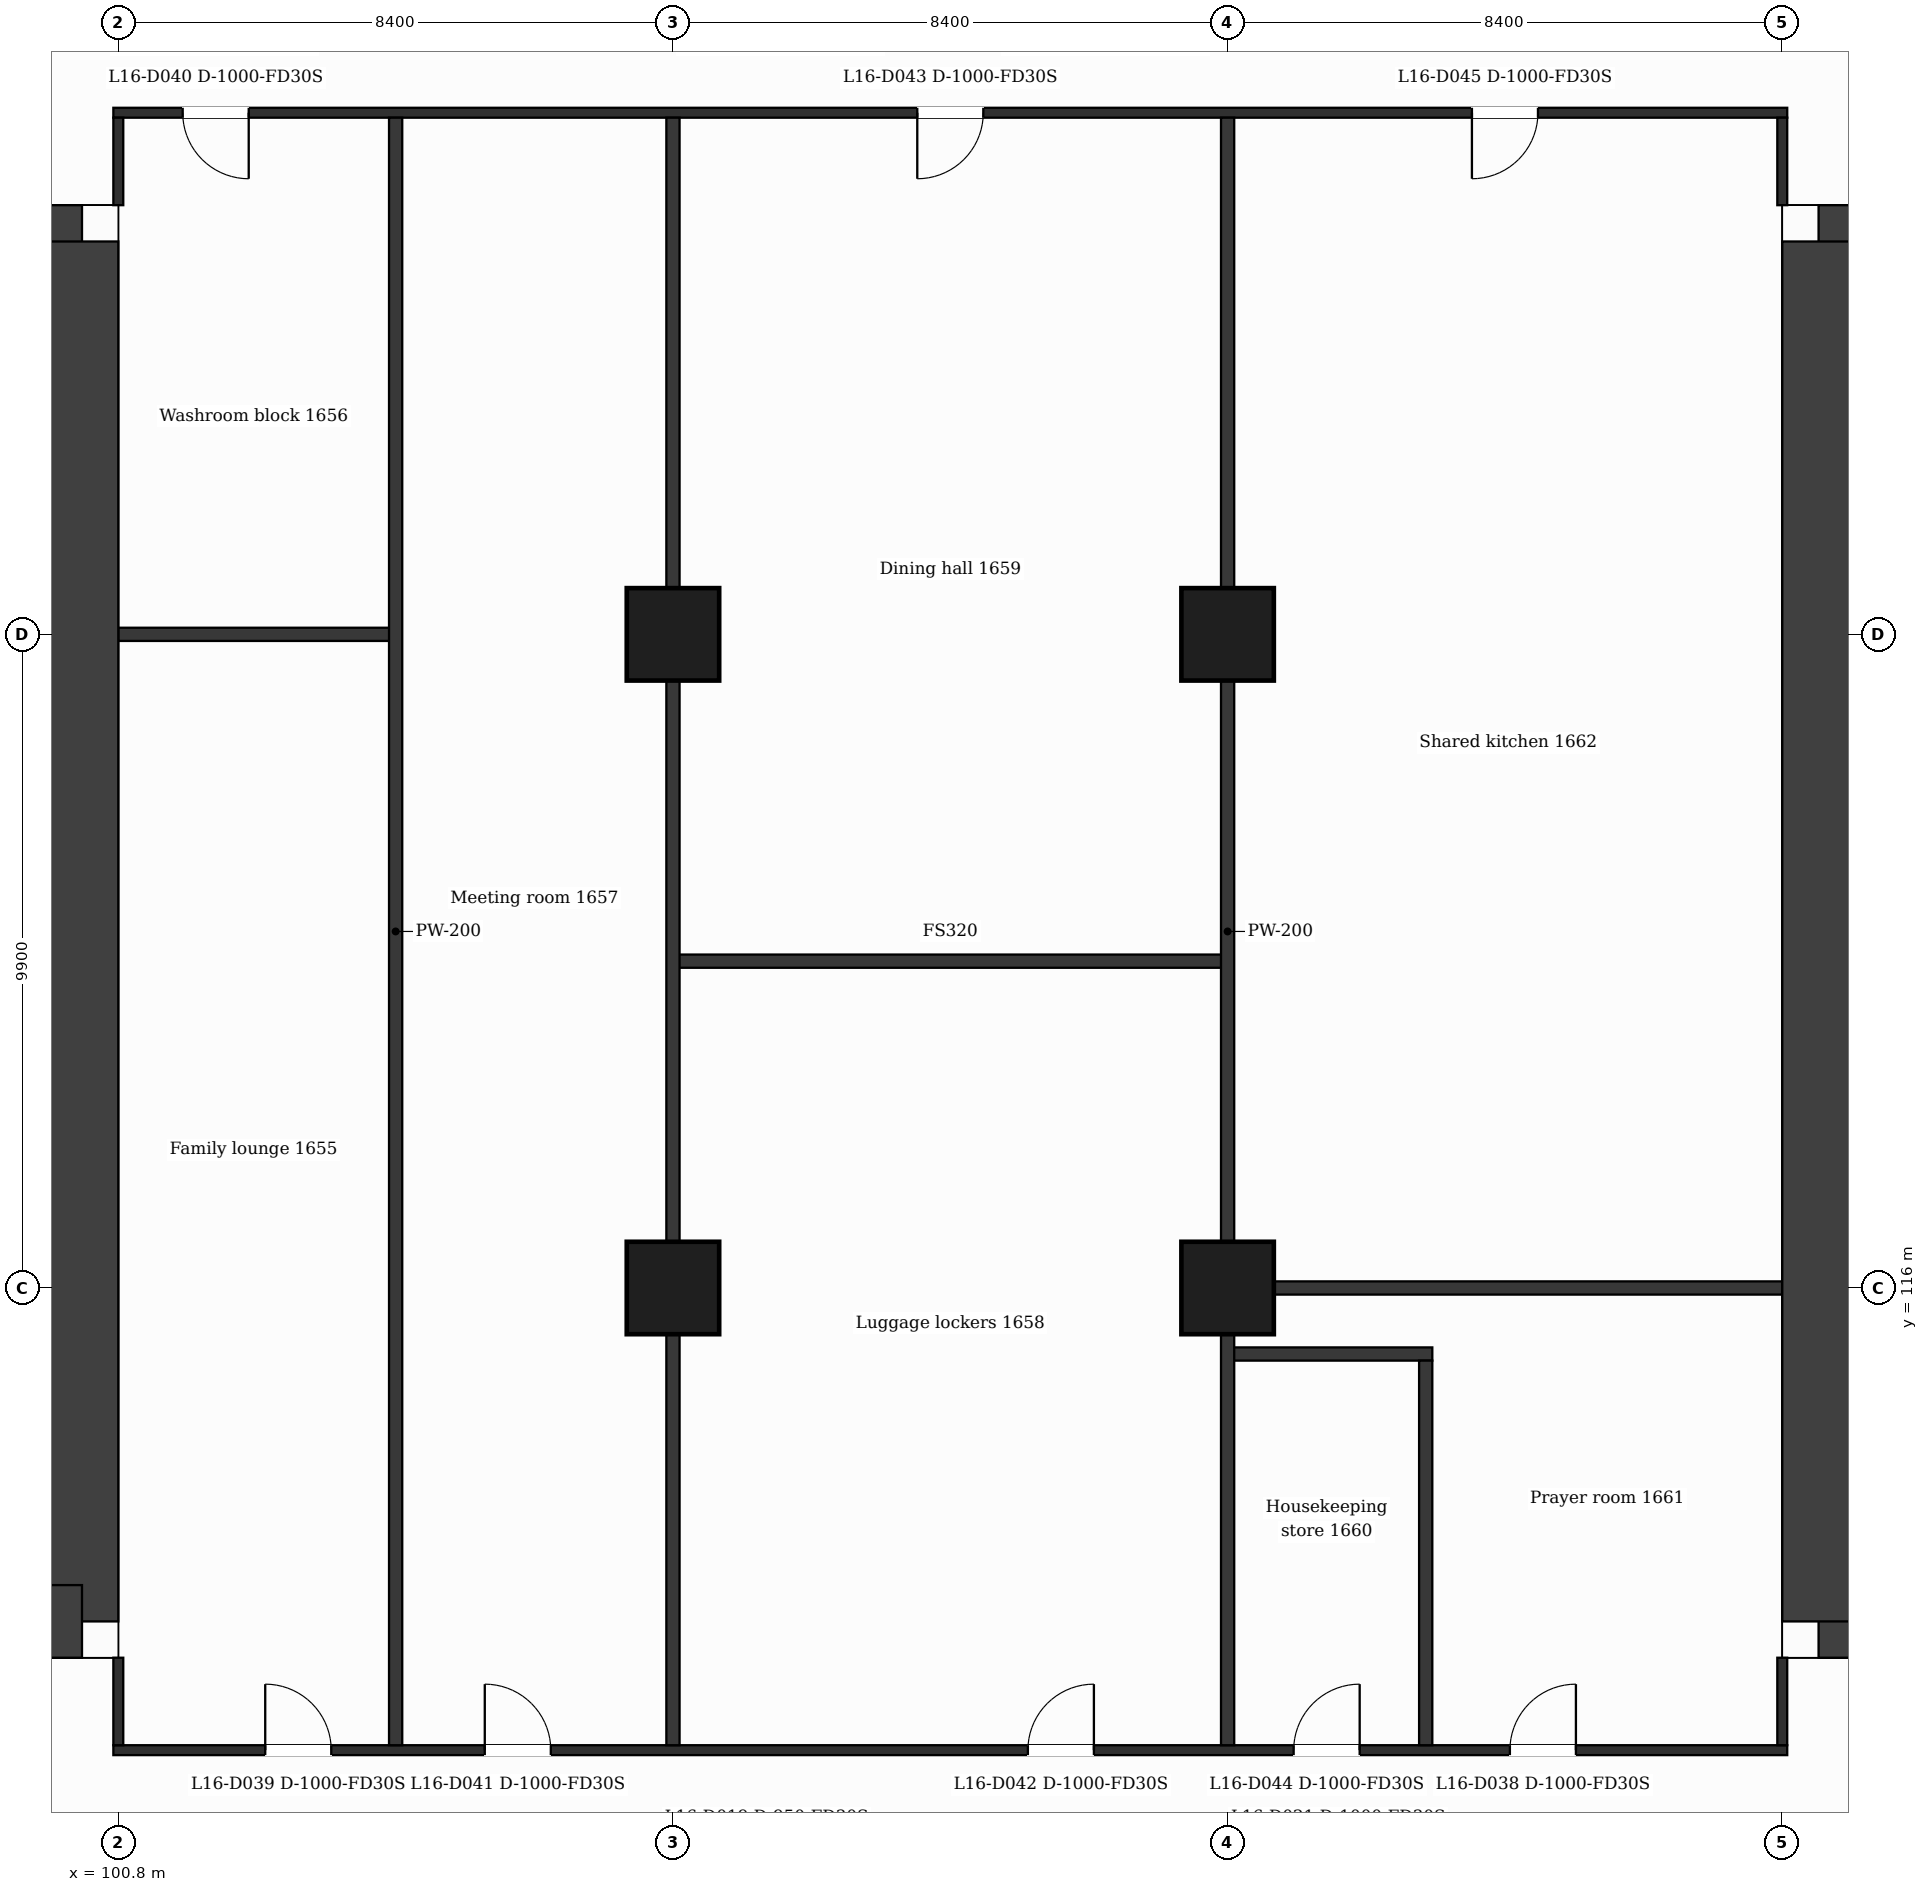
"""IFC4 building model, lengths in metres.
Left out: names, types, materials, properties, quantities, classifications, styles, units other than length and angle.
Written with IfcOpenShell. Run it as: python <this file> out.ifc"""

import sys

from ifc_helpers import new_model, si_unit, direction, frame, frame_2d, origin, origin_2d, place, context, subcontext, project, spatial, rectangle, extrude, element, fill, save


model = new_model("IFC4")
c1 = context("Model", 3, precision=1e-05, world=origin(), true_north=direction((0.0, 1.0)))
c2 = subcontext(c1, "Body", "Model", "MODEL_VIEW")
j1 = project(units=[si_unit("LENGTHUNIT", "METRE"), si_unit("PLANEANGLEUNIT", "RADIAN")], contexts=[c1])
p1 = place(None, origin())
s1 = spatial("IfcSite", under=j1, at=p1, CompositionType="ELEMENT")
p2 = place(p1, origin())
s2 = spatial("IfcBuilding", under=s1, at=p2, CompositionType="ELEMENT")
p3 = place(p2, frame((0.0, 0.0, 74.0)))
s3 = spatial("IfcBuildingStorey", under=s2, at=p3, CompositionType="ELEMENT", Elevation=74.0)
p4 = place(p3, frame((89.112, 131.85, 0.0), z_axis=(0.0, 0.0, 1.0), x_axis=(1.0, 0.0, 0.0)))
e1 = element("IfcWall", 1, at=p4, inside=s3, PredefinedType="SHEAR", context=c2, shape_type="SweptSolid", body=[
    extrude(rectangle(XDim=11.138, YDim=1.1, at=frame_2d((5.569, 0.0))), origin(), (0.0, 0.0, 1.0), 3.5),
])
p5 = place(p4, frame((6.552, 0.0, 0.0)))
e2 = element("IfcOpeningElement", 2, at=p5, cuts=e1, PredefinedType="OPENING", context=c2, shape_type="SweptSolid", body=[
    extrude(rectangle(XDim=1.2, YDim=2.1, at=frame_2d((0.6, 1.05))), frame((0.0, 0.56, 0.0), z_axis=(0.0, -1.0, 0.0), x_axis=(1.0, 0.0, 0.0)), (0.0, 0.0, 1.0), 1.12),
])
p6 = place(p3, frame((100.25, 131.85, 0.0), z_axis=(0.0, 0.0, 1.0), x_axis=(0.0, -1.0, 0.0)))
e3 = element("IfcWall", 3, at=p6, inside=s3, PredefinedType="SHEAR", context=c2, shape_type="SweptSolid", body=[
    extrude(rectangle(XDim=20.9, YDim=1.1, at=frame_2d((10.45, 0.0))), origin(), (0.0, 0.0, 1.0), 3.5),
])
p7 = place(p3, frame((100.25, 110.95, 0.0), z_axis=(0.0, 0.0, 1.0), x_axis=(-1.0, 0.0, 0.0)))
e4 = element("IfcWall", 4, at=p7, inside=s3, PredefinedType="SHEAR", context=c2, shape_type="SweptSolid", body=[
    extrude(rectangle(XDim=13.952, YDim=1.1, at=frame_2d((6.976, 0.0))), origin(), (0.0, 0.0, 1.0), 3.5),
])
p8 = place(p7, frame((5.748, 0.0, 0.0)))
e5 = element("IfcOpeningElement", 5, at=p8, cuts=e4, PredefinedType="OPENING", context=c2, shape_type="SweptSolid", body=[
    extrude(rectangle(XDim=1.4, YDim=2.1, at=frame_2d((0.7, 1.05))), frame((0.0, 0.56, 0.0), z_axis=(0.0, -1.0, 0.0), x_axis=(1.0, 0.0, 0.0)), (0.0, 0.0, 1.0), 1.12),
])
p9 = place(p3, frame((126.55, 131.85, 0.0), z_axis=(0.0, 0.0, 1.0), x_axis=(1.0, 0.0, 0.0)))
e6 = element("IfcWall", 6, at=p9, inside=s3, PredefinedType="SHEAR", context=c2, shape_type="SweptSolid", body=[
    extrude(rectangle(XDim=11.138, YDim=1.1, at=frame_2d((5.569, 0.0))), origin(), (0.0, 0.0, 1.0), 3.5),
])
p10 = place(p9, frame((3.386, 0.0, 0.0)))
e7 = element("IfcOpeningElement", 7, at=p10, cuts=e6, PredefinedType="OPENING", context=c2, shape_type="SweptSolid", body=[
    extrude(rectangle(XDim=1.2, YDim=2.1, at=frame_2d((0.6, 1.05))), frame((0.0, 0.56, 0.0), z_axis=(0.0, -1.0, 0.0), x_axis=(1.0, 0.0, 0.0)), (0.0, 0.0, 1.0), 1.12),
])
p11 = place(p3, frame((140.502, 110.95, 0.0), z_axis=(0.0, 0.0, 1.0), x_axis=(-1.0, 0.0, 0.0)))
e8 = element("IfcWall", 8, at=p11, inside=s3, PredefinedType="SHEAR", context=c2, shape_type="SweptSolid", body=[
    extrude(rectangle(XDim=13.952, YDim=1.1, at=frame_2d((6.976, 0.0))), origin(), (0.0, 0.0, 1.0), 3.5),
])
p12 = place(p11, frame((6.804, 0.0, 0.0)))
e9 = element("IfcOpeningElement", 9, at=p12, cuts=e8, PredefinedType="OPENING", context=c2, shape_type="SweptSolid", body=[
    extrude(rectangle(XDim=1.4, YDim=2.1, at=frame_2d((0.7, 1.05))), frame((0.0, 0.56, 0.0), z_axis=(0.0, -1.0, 0.0), x_axis=(1.0, 0.0, 0.0)), (0.0, 0.0, 1.0), 1.12),
])
p13 = place(p3, frame((126.55, 110.95, 0.0), z_axis=(0.0, 0.0, 1.0), x_axis=(0.0, 1.0, 0.0)))
e10 = element("IfcWall", 10, at=p13, inside=s3, PredefinedType="SHEAR", context=c2, shape_type="SweptSolid", body=[
    extrude(rectangle(XDim=20.9, YDim=1.1, at=frame_2d((10.45, 0.0))), origin(), (0.0, 0.0, 1.0), 3.5),
])
for number, where, z_axis, x_axis in (
    (11, (109.2, 116.0, 0.0), (0.0, 0.0, 1.0), (1.0, 0.0, 0.0)),
    (12, (117.6, 116.0, 0.0), (0.0, 0.0, 1.0), (1.0, 0.0, 0.0)),
    (13, (109.2, 125.9, 0.0), (0.0, 0.0, 1.0), (1.0, 0.0, 0.0)),
    (14, (117.6, 125.9, 0.0), (0.0, 0.0, 1.0), (1.0, 0.0, 0.0)),
):
    element("IfcColumn", number, at=place(p3, frame(where, z_axis=z_axis, x_axis=x_axis)), inside=s3, PredefinedType="COLUMN", context=c2, shape_type="SweptSolid", body=[
        extrude(rectangle(XDim=1.4, YDim=1.4, at=origin_2d()), origin(), (0.0, 0.0, 1.0), 3.5),
    ])
p14 = place(p3, frame((100.725, 109.0, 0.0), z_axis=(0.0, 0.0, 1.0), x_axis=(1.0, 0.0, 0.0)))
e15 = element("IfcWall", 15, at=p14, inside=s3, PredefinedType="PARTITIONING", context=c2, shape_type="SweptSolid", body=[
    extrude(rectangle(XDim=25.35, YDim=0.15, at=frame_2d((12.675, 0.0))), origin(), (0.0, 0.0, 1.0), 3.18),
])
p15 = place(p14, frame((21.15, 0.0, 0.0)))
e16 = element("IfcOpeningElement", 16, at=p15, cuts=e15, PredefinedType="OPENING", context=c2, shape_type="SweptSolid", body=[
    extrude(rectangle(XDim=1.0, YDim=2.1, at=frame_2d((0.5, 1.05))), frame((0.0, 0.085, 0.0), z_axis=(0.0, -1.0, 0.0), x_axis=(1.0, 0.0, 0.0)), (0.0, 0.0, 1.0), 0.17),
])
p16 = place(p14, frame((2.3, 0.0, 0.0)))
e17 = element("IfcOpeningElement", 17, at=p16, cuts=e15, PredefinedType="OPENING", context=c2, shape_type="SweptSolid", body=[
    extrude(rectangle(XDim=1.0, YDim=2.1, at=frame_2d((0.5, 1.05))), frame((0.0, 0.085, 0.0), z_axis=(0.0, -1.0, 0.0), x_axis=(1.0, 0.0, 0.0)), (0.0, 0.0, 1.0), 0.17),
])
p17 = place(p14, frame((5.625, 0.0, 0.0)))
e18 = element("IfcOpeningElement", 18, at=p17, cuts=e15, PredefinedType="OPENING", context=c2, shape_type="SweptSolid", body=[
    extrude(rectangle(XDim=1.0, YDim=2.1, at=frame_2d((0.5, 1.05))), frame((0.0, 0.085, 0.0), z_axis=(0.0, -1.0, 0.0), x_axis=(1.0, 0.0, 0.0)), (0.0, 0.0, 1.0), 0.17),
])
p18 = place(p14, frame((13.85, 0.0, 0.0)))
e19 = element("IfcOpeningElement", 19, at=p18, cuts=e15, PredefinedType="OPENING", context=c2, shape_type="SweptSolid", body=[
    extrude(rectangle(XDim=1.0, YDim=2.1, at=frame_2d((0.5, 1.05))), frame((0.0, 0.085, 0.0), z_axis=(0.0, -1.0, 0.0), x_axis=(1.0, 0.0, 0.0)), (0.0, 0.0, 1.0), 0.17),
])
p19 = place(p14, frame((17.875, 0.0, 0.0)))
e20 = element("IfcOpeningElement", 20, at=p19, cuts=e15, PredefinedType="OPENING", context=c2, shape_type="SweptSolid", body=[
    extrude(rectangle(XDim=1.0, YDim=2.1, at=frame_2d((0.5, 1.05))), frame((0.0, 0.085, 0.0), z_axis=(0.0, -1.0, 0.0), x_axis=(1.0, 0.0, 0.0)), (0.0, 0.0, 1.0), 0.17),
])
p20 = place(p3, frame((117.6, 115.0, 0.0), z_axis=(0.0, 0.0, 1.0), x_axis=(1.0, 0.0, 0.0)))
e21 = element("IfcWall", 21, at=p20, inside=s3, PredefinedType="PARTITIONING", context=c2, shape_type="SweptSolid", body=[
    extrude(rectangle(XDim=3.1, YDim=0.2, at=frame_2d((1.55, 0.0))), origin(), (0.0, 0.0, 1.0), 3.18),
])
p21 = place(p3, frame((117.6, 116.0, 0.0), z_axis=(0.0, 0.0, 1.0), x_axis=(1.0, 0.0, 0.0)))
e22 = element("IfcWall", 22, at=p21, inside=s3, PredefinedType="PARTITIONING", context=c2, shape_type="SweptSolid", body=[
    extrude(rectangle(XDim=8.4, YDim=0.2, at=frame_2d((4.2, 0.0))), origin(), (0.0, 0.0, 1.0), 3.18),
])
p22 = place(p3, frame((109.2, 120.95, 0.0), z_axis=(0.0, 0.0, 1.0), x_axis=(1.0, 0.0, 0.0)))
e23 = element("IfcWall", 23, at=p22, inside=s3, PredefinedType="PARTITIONING", context=c2, shape_type="SweptSolid", body=[
    extrude(rectangle(XDim=8.4, YDim=0.2, at=frame_2d((4.2, 0.0))), origin(), (0.0, 0.0, 1.0), 3.18),
])
p23 = place(p3, frame((100.8, 125.9, 0.0), z_axis=(0.0, 0.0, 1.0), x_axis=(1.0, 0.0, 0.0)))
e24 = element("IfcWall", 24, at=p23, inside=s3, PredefinedType="PARTITIONING", context=c2, shape_type="SweptSolid", body=[
    extrude(rectangle(XDim=4.2, YDim=0.2, at=frame_2d((2.1, 0.0))), origin(), (0.0, 0.0, 1.0), 3.18),
])
p24 = place(p3, frame((100.725, 133.8, 0.0), z_axis=(0.0, 0.0, 1.0), x_axis=(1.0, 0.0, 0.0)))
e25 = element("IfcWall", 25, at=p24, inside=s3, PredefinedType="PARTITIONING", context=c2, shape_type="SweptSolid", body=[
    extrude(rectangle(XDim=25.35, YDim=0.15, at=frame_2d((12.675, 0.0))), origin(), (0.0, 0.0, 1.0), 3.18),
])
p25 = place(p24, frame((1.05, 0.0, 0.0)))
e26 = element("IfcOpeningElement", 26, at=p25, cuts=e25, PredefinedType="OPENING", context=c2, shape_type="SweptSolid", body=[
    extrude(rectangle(XDim=1.0, YDim=2.1, at=frame_2d((0.5, 1.05))), frame((0.0, 0.085, 0.0), z_axis=(0.0, -1.0, 0.0), x_axis=(1.0, 0.0, 0.0)), (0.0, 0.0, 1.0), 0.17),
])
p26 = place(p24, frame((12.175, 0.0, 0.0)))
e27 = element("IfcOpeningElement", 27, at=p26, cuts=e25, PredefinedType="OPENING", context=c2, shape_type="SweptSolid", body=[
    extrude(rectangle(XDim=1.0, YDim=2.1, at=frame_2d((0.5, 1.05))), frame((0.0, 0.085, 0.0), z_axis=(0.0, -1.0, 0.0), x_axis=(1.0, 0.0, 0.0)), (0.0, 0.0, 1.0), 0.17),
])
p27 = place(p24, frame((20.575, 0.0, 0.0)))
e28 = element("IfcOpeningElement", 28, at=p27, cuts=e25, PredefinedType="OPENING", context=c2, shape_type="SweptSolid", body=[
    extrude(rectangle(XDim=1.0, YDim=2.1, at=frame_2d((0.5, 1.05))), frame((0.0, 0.085, 0.0), z_axis=(0.0, -1.0, 0.0), x_axis=(1.0, 0.0, 0.0)), (0.0, 0.0, 1.0), 0.17),
])
p28 = place(p3, frame((100.8, 109.075, 0.0), z_axis=(0.0, 0.0, 1.0), x_axis=(0.0, 1.0, 0.0)))
e29 = element("IfcWall", 29, at=p28, inside=s3, PredefinedType="PARTITIONING", context=c2, shape_type="SweptSolid", body=[
    extrude(rectangle(XDim=1.325, YDim=0.15, at=frame_2d((0.663, 0.0))), origin(), (0.0, 0.0, 1.0), 3.18),
])
p29 = place(p3, frame((100.8, 132.4, 0.0), z_axis=(0.0, 0.0, 1.0), x_axis=(0.0, 1.0, 0.0)))
e30 = element("IfcWall", 30, at=p29, inside=s3, PredefinedType="PARTITIONING", context=c2, shape_type="SweptSolid", body=[
    extrude(rectangle(XDim=1.325, YDim=0.15, at=frame_2d((0.663, 0.0))), origin(), (0.0, 0.0, 1.0), 3.18),
])
for number, where, z_axis, x_axis in (
    (31, (105.0, 109.075, 0.0), (0.0, 0.0, 1.0), (0.0, 1.0, 0.0)),
    (32, (109.2, 109.075, 0.0), (0.0, 0.0, 1.0), (0.0, 1.0, 0.0)),
    (33, (117.6, 109.075, 0.0), (0.0, 0.0, 1.0), (0.0, 1.0, 0.0)),
):
    element("IfcWall", number, at=place(p3, frame(where, z_axis=z_axis, x_axis=x_axis)), inside=s3, PredefinedType="PARTITIONING", context=c2, shape_type="SweptSolid", body=[
        extrude(rectangle(XDim=24.65, YDim=0.2, at=frame_2d((12.325, 0.0))), origin(), (0.0, 0.0, 1.0), 3.18),
    ])
p30 = place(p3, frame((120.6, 109.075, 0.0), z_axis=(0.0, 0.0, 1.0), x_axis=(0.0, 1.0, 0.0)))
e34 = element("IfcWall", 34, at=p30, inside=s3, PredefinedType="PARTITIONING", context=c2, shape_type="SweptSolid", body=[
    extrude(rectangle(XDim=5.825, YDim=0.2, at=frame_2d((2.913, 0.0))), origin(), (0.0, 0.0, 1.0), 3.18),
])
p31 = place(p3, frame((126.0, 109.075, 0.0), z_axis=(0.0, 0.0, 1.0), x_axis=(0.0, 1.0, 0.0)))
e35 = element("IfcWall", 35, at=p31, inside=s3, PredefinedType="PARTITIONING", context=c2, shape_type="SweptSolid", body=[
    extrude(rectangle(XDim=1.325, YDim=0.15, at=frame_2d((0.663, 0.0))), origin(), (0.0, 0.0, 1.0), 3.18),
])
p32 = place(p3, frame((126.0, 132.4, 0.0), z_axis=(0.0, 0.0, 1.0), x_axis=(0.0, 1.0, 0.0)))
e36 = element("IfcWall", 36, at=p32, inside=s3, PredefinedType="PARTITIONING", context=c2, shape_type="SweptSolid", body=[
    extrude(rectangle(XDim=1.325, YDim=0.15, at=frame_2d((0.663, 0.0))), origin(), (0.0, 0.0, 1.0), 3.18),
])
p33 = place(p15, origin())
e37 = element("IfcDoor", 37, at=p33, inside=s3, OperationType="SINGLE_SWING_RIGHT", PredefinedType="DOOR", context=c2, shape_type="SweptSolid", body=[
    extrude(rectangle(XDim=1.0, YDim=2.1, at=frame_2d((0.5, 1.05))), frame((0.0, 0.025, 0.0), z_axis=(0.0, -1.0, 0.0), x_axis=(1.0, 0.0, 0.0)), (0.0, 0.0, 1.0), 0.05),
])
fill(e16, e37)
p34 = place(p16, origin())
e38 = element("IfcDoor", 38, at=p34, inside=s3, OperationType="SINGLE_SWING_LEFT", PredefinedType="DOOR", context=c2, shape_type="SweptSolid", body=[
    extrude(rectangle(XDim=1.0, YDim=2.1, at=frame_2d((0.5, 1.05))), frame((0.0, 0.025, 0.0), z_axis=(0.0, -1.0, 0.0), x_axis=(1.0, 0.0, 0.0)), (0.0, 0.0, 1.0), 0.05),
])
fill(e17, e38)
p35 = place(p25, origin())
e39 = element("IfcDoor", 39, at=p35, inside=s3, OperationType="SINGLE_SWING_RIGHT", PredefinedType="DOOR", context=c2, shape_type="SweptSolid", body=[
    extrude(rectangle(XDim=1.0, YDim=2.1, at=frame_2d((0.5, 1.05))), frame((0.0, 0.025, 0.0), z_axis=(0.0, -1.0, 0.0), x_axis=(1.0, 0.0, 0.0)), (0.0, 0.0, 1.0), 0.05),
])
fill(e26, e39)
p36 = place(p17, origin())
e40 = element("IfcDoor", 40, at=p36, inside=s3, OperationType="SINGLE_SWING_LEFT", PredefinedType="DOOR", context=c2, shape_type="SweptSolid", body=[
    extrude(rectangle(XDim=1.0, YDim=2.1, at=frame_2d((0.5, 1.05))), frame((0.0, 0.025, 0.0), z_axis=(0.0, -1.0, 0.0), x_axis=(1.0, 0.0, 0.0)), (0.0, 0.0, 1.0), 0.05),
])
fill(e18, e40)
p37 = place(p18, origin())
e41 = element("IfcDoor", 41, at=p37, inside=s3, OperationType="SINGLE_SWING_RIGHT", PredefinedType="DOOR", context=c2, shape_type="SweptSolid", body=[
    extrude(rectangle(XDim=1.0, YDim=2.1, at=frame_2d((0.5, 1.05))), frame((0.0, 0.025, 0.0), z_axis=(0.0, -1.0, 0.0), x_axis=(1.0, 0.0, 0.0)), (0.0, 0.0, 1.0), 0.05),
])
fill(e19, e41)
p38 = place(p26, origin())
e42 = element("IfcDoor", 42, at=p38, inside=s3, OperationType="SINGLE_SWING_LEFT", PredefinedType="DOOR", context=c2, shape_type="SweptSolid", body=[
    extrude(rectangle(XDim=1.0, YDim=2.1, at=frame_2d((0.5, 1.05))), frame((0.0, 0.025, 0.0), z_axis=(0.0, -1.0, 0.0), x_axis=(1.0, 0.0, 0.0)), (0.0, 0.0, 1.0), 0.05),
])
fill(e27, e42)
p39 = place(p19, origin())
e43 = element("IfcDoor", 43, at=p39, inside=s3, OperationType="SINGLE_SWING_RIGHT", PredefinedType="DOOR", context=c2, shape_type="SweptSolid", body=[
    extrude(rectangle(XDim=1.0, YDim=2.1, at=frame_2d((0.5, 1.05))), frame((0.0, 0.025, 0.0), z_axis=(0.0, -1.0, 0.0), x_axis=(1.0, 0.0, 0.0)), (0.0, 0.0, 1.0), 0.05),
])
fill(e20, e43)
p40 = place(p27, origin())
e44 = element("IfcDoor", 44, at=p40, inside=s3, OperationType="SINGLE_SWING_LEFT", PredefinedType="DOOR", context=c2, shape_type="SweptSolid", body=[
    extrude(rectangle(XDim=1.0, YDim=2.1, at=frame_2d((0.5, 1.05))), frame((0.0, 0.025, 0.0), z_axis=(0.0, -1.0, 0.0), x_axis=(1.0, 0.0, 0.0)), (0.0, 0.0, 1.0), 0.05),
])
fill(e28, e44)
save(model, sys.argv[1])
